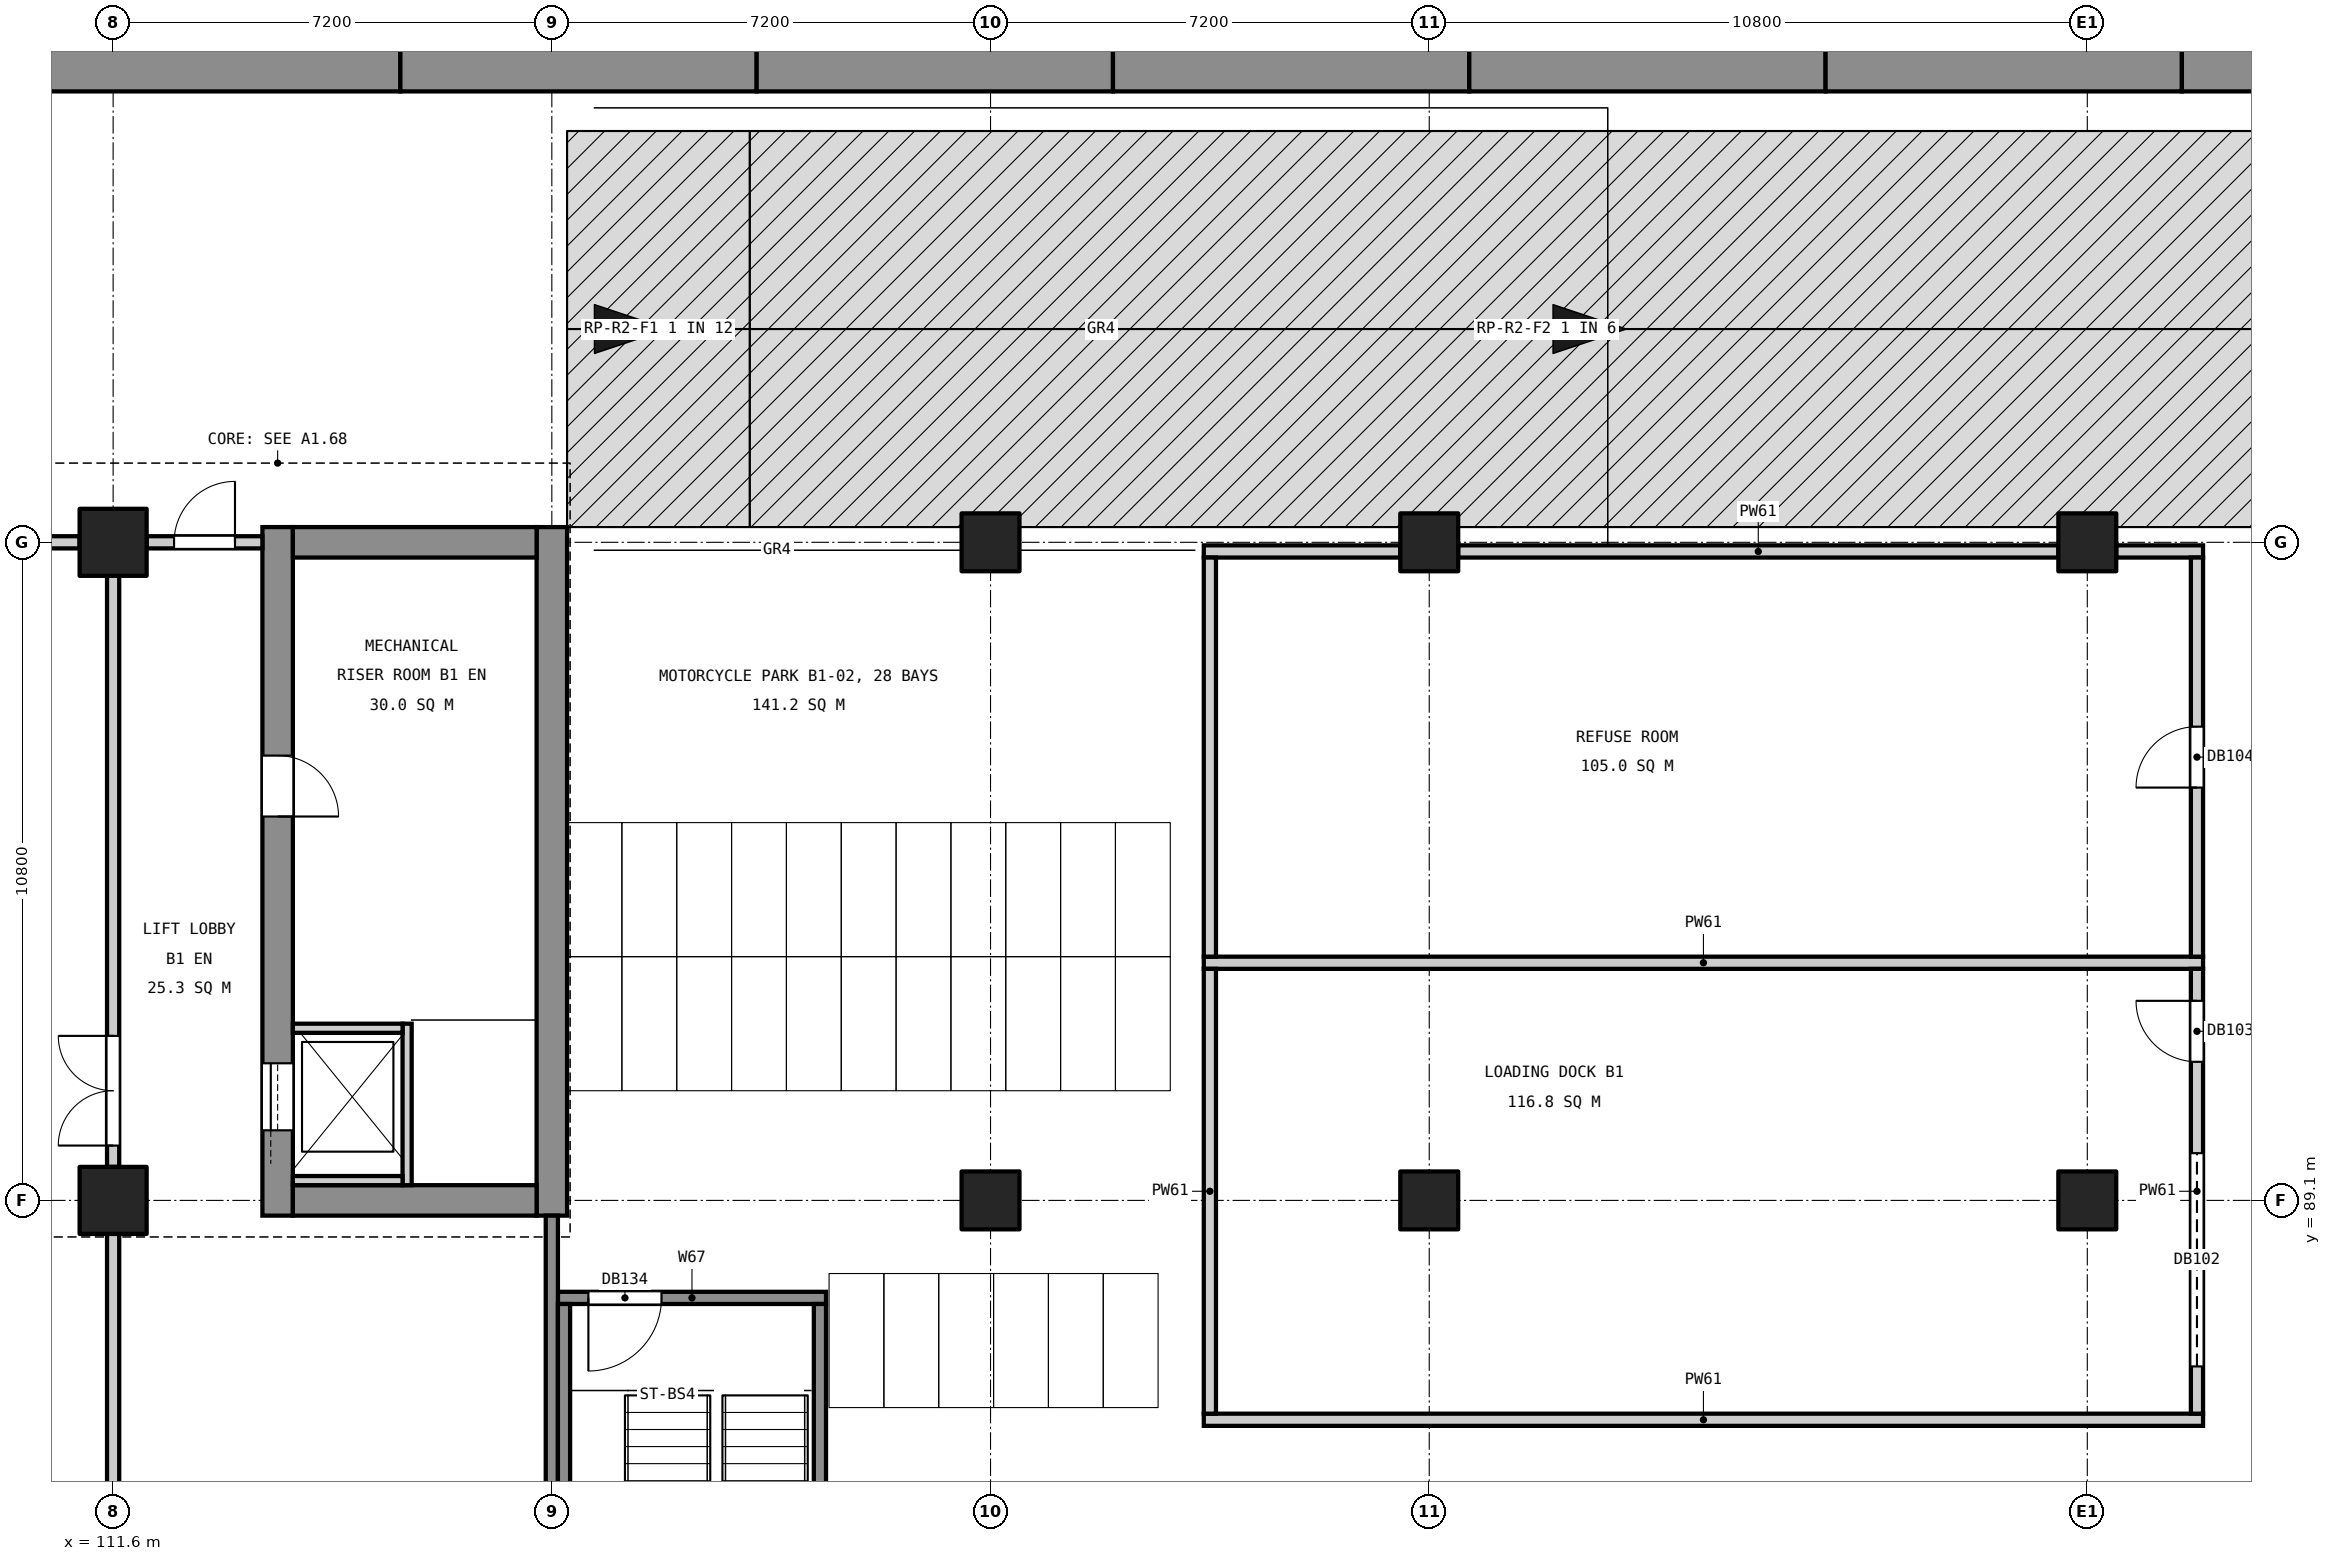
"""IFC4 building model, lengths in metres.
Left out: names, types, materials, properties, quantities, classifications, styles, units other than length and angle.
Written with IfcOpenShell. Run it as: python <this file> out.ifc"""

import sys

from ifc_helpers import new_model, si_unit, direction, frame, frame_2d, origin, origin_2d, place, context, subcontext, project, spatial, rectangle, extrude, element, fill, save


model = new_model("IFC4")
c1 = context("Model", 3, precision=1e-05, world=origin(), true_north=direction((0.0, 1.0)))
c2 = subcontext(c1, "Body", "Model", "MODEL_VIEW")
j1 = project(units=[si_unit("LENGTHUNIT", "METRE"), si_unit("PLANEANGLEUNIT", "RADIAN")], contexts=[c1])
p1 = place(None, origin())
s1 = spatial("IfcSite", under=j1, at=p1, CompositionType="ELEMENT")
p2 = place(p1, origin())
s2 = spatial("IfcBuilding", under=s1, at=p2, CompositionType="ELEMENT")
p3 = place(p2, frame((0.0, 0.0, -4.8)))
s3 = spatial("IfcBuildingStorey", under=s2, at=p3, CompositionType="ELEMENT", Elevation=-4.8)
for number, where, z_axis, x_axis in (
    (1, (111.6, 89.1, 0.0), (0.0, 0.0, 1.0), (1.0, 0.0, 0.0)),
    (2, (111.6, 99.9, 0.0), (0.0, 0.0, 1.0), (1.0, 0.0, 0.0)),
):
    element("IfcColumn", number, at=place(p3, frame(where, z_axis=z_axis, x_axis=x_axis)), inside=s3, PredefinedType="COLUMN", context=c2, shape_type="SweptSolid", body=[
        extrude(rectangle(XDim=1.1, YDim=1.1, at=origin_2d()), origin(), (0.0, 0.0, 1.0), 4.5),
    ])
for number, where, z_axis, x_axis in (
    (3, (126.0, 89.1, 0.0), (0.0, 0.0, 1.0), (1.0, 0.0, 0.0)),
    (4, (126.0, 99.9, 0.0), (0.0, 0.0, 1.0), (1.0, 0.0, 0.0)),
    (5, (133.2, 89.1, 0.0), (0.0, 0.0, 1.0), (1.0, 0.0, 0.0)),
    (6, (133.2, 99.9, 0.0), (0.0, 0.0, 1.0), (1.0, 0.0, 0.0)),
    (7, (144.0, 89.1, 0.0), (0.0, 0.0, 1.0), (1.0, 0.0, 0.0)),
    (8, (144.0, 99.9, 0.0), (0.0, 0.0, 1.0), (1.0, 0.0, 0.0)),
):
    element("IfcColumn", number, at=place(p3, frame(where, z_axis=z_axis, x_axis=x_axis)), inside=s3, PredefinedType="COLUMN", context=c2, shape_type="SweptSolid", body=[
        extrude(rectangle(XDim=0.95, YDim=0.95, at=origin_2d()), origin(), (0.0, 0.0, 1.0), 4.35),
    ])
for number, where, z_axis, x_axis in (
    (9, (110.467, 107.7, -18.2), (0.0, 0.0, 1.0), (1.0, 0.0, 0.0)),
    (10, (116.314, 107.7, -18.2), (0.0, 0.0, 1.0), (1.0, 0.0, 0.0)),
    (11, (122.162, 107.7, -18.2), (0.0, 0.0, 1.0), (1.0, 0.0, 0.0)),
    (12, (128.01, 107.7, -18.2), (0.0, 0.0, 1.0), (1.0, 0.0, 0.0)),
    (13, (133.857, 107.7, -18.2), (0.0, 0.0, 1.0), (1.0, 0.0, 0.0)),
    (14, (139.705, 107.7, -18.2), (0.0, 0.0, 1.0), (1.0, 0.0, 0.0)),
):
    element("IfcWall", number, at=place(p3, frame(where, z_axis=z_axis, x_axis=x_axis)), inside=s3, PredefinedType="SOLIDWALL", context=c2, shape_type="SweptSolid", body=[
        extrude(rectangle(XDim=5.848, YDim=0.8, at=frame_2d((2.924, 0.0))), origin(), (0.0, 0.0, 1.0), 21.55),
    ])
p4 = place(p3, frame((145.552, 107.7, -18.2), z_axis=(0.0, 0.0, 1.0), x_axis=(1.0, 0.0, 0.0)))
e15 = element("IfcWall", 15, at=p4, inside=s3, PredefinedType="SOLIDWALL", context=c2, shape_type="SweptSolid", body=[
    extrude(rectangle(XDim=5.847, YDim=0.8, at=frame_2d((2.924, 0.0))), origin(), (0.0, 0.0, 1.0), 21.55),
])
p5 = place(p3, frame((118.8, 88.85, 0.0), z_axis=(0.0, 0.0, 1.0), x_axis=(0.0, 1.0, 0.0)))
e16 = element("IfcWall", 16, at=p5, inside=s3, PredefinedType="SHEAR", context=c2, shape_type="SweptSolid", body=[
    extrude(rectangle(XDim=11.3, YDim=0.5, at=frame_2d((5.65, 0.0))), origin(), (0.0, 0.0, 1.0), 4.5),
])
p6 = place(p3, frame((114.3, 88.85, 0.0), z_axis=(0.0, 0.0, 1.0), x_axis=(0.0, 1.0, 0.0)))
e17 = element("IfcWall", 17, at=p6, inside=s3, PredefinedType="SHEAR", context=c2, shape_type="SweptSolid", body=[
    extrude(rectangle(XDim=11.3, YDim=0.5, at=frame_2d((5.65, 0.0))), origin(), (0.0, 0.0, 1.0), 4.5),
])
p7 = place(p6, frame((1.4, 0.0, 0.0)))
e18 = element("IfcOpeningElement", 18, at=p7, cuts=e17, PredefinedType="OPENING", context=c2, shape_type="SweptSolid", body=[
    extrude(rectangle(XDim=1.1, YDim=2.1, at=frame_2d((0.55, 1.05))), frame((0.0, 0.26, 0.0), z_axis=(0.0, -1.0, 0.0), x_axis=(1.0, 0.0, 0.0)), (0.0, 0.0, 1.0), 0.52),
])
p8 = place(p6, frame((6.55, 0.0, 0.0)))
e19 = element("IfcOpeningElement", 19, at=p8, cuts=e17, PredefinedType="OPENING", context=c2, shape_type="SweptSolid", body=[
    extrude(rectangle(XDim=1.0, YDim=2.1, at=frame_2d((0.5, 1.05))), frame((0.0, 0.26, 0.0), z_axis=(0.0, -1.0, 0.0), x_axis=(1.0, 0.0, 0.0)), (0.0, 0.0, 1.0), 0.52),
])
for number, where, z_axis, x_axis in (
    (20, (118.55, 89.1, 0.0), (0.0, 0.0, 1.0), (-1.0, 0.0, 0.0)),
    (21, (118.55, 99.9, 0.0), (0.0, 0.0, 1.0), (-1.0, 0.0, 0.0)),
):
    element("IfcWall", number, at=place(p3, frame(where, z_axis=z_axis, x_axis=x_axis)), inside=s3, PredefinedType="SHEAR", context=c2, shape_type="SweptSolid", body=[
        extrude(rectangle(XDim=4.0, YDim=0.5, at=frame_2d((2.0, 0.0))), origin(), (0.0, 0.0, 1.0), 4.5),
    ])
p9 = place(p3, frame((116.425, 92.0, 0.0), z_axis=(0.0, 0.0, 1.0), x_axis=(0.0, -1.0, 0.0)))
e22 = element("IfcWall", 22, at=p9, inside=s3, PredefinedType="SOLIDWALL", context=c2, shape_type="SweptSolid", body=[
    extrude(rectangle(XDim=2.65, YDim=0.15, at=frame_2d((1.325, 0.0))), origin(), (0.0, 0.0, 1.0), 4.8),
])
for number, where, z_axis, x_axis in (
    (23, (116.35, 91.925, 0.0), (0.0, 0.0, 1.0), (-1.0, 0.0, 0.0)),
    (24, (116.35, 89.425, 0.0), (0.0, 0.0, 1.0), (-1.0, 0.0, 0.0)),
):
    element("IfcWall", number, at=place(p3, frame(where, z_axis=z_axis, x_axis=x_axis)), inside=s3, PredefinedType="SOLIDWALL", context=c2, shape_type="SweptSolid", body=[
        extrude(rectangle(XDim=1.8, YDim=0.15, at=frame_2d((0.9, 0.0))), origin(), (0.0, 0.0, 1.0), 4.8),
    ])
p10 = place(p3, frame((129.5, 85.5, 0.0), z_axis=(0.0, 0.0, 1.0), x_axis=(1.0, 0.0, 0.0)))
e25 = element("IfcWall", 25, at=p10, inside=s3, PredefinedType="PARTITIONING", context=c2, shape_type="SweptSolid", body=[
    extrude(rectangle(XDim=16.4, YDim=0.2, at=frame_2d((8.2, 0.0))), origin(), (0.0, 0.0, 1.0), 4.35),
])
p11 = place(p3, frame((118.9, 87.5, 0.0), z_axis=(0.0, 0.0, 1.0), x_axis=(1.0, 0.0, 0.0)))
e26 = element("IfcWall", 26, at=p11, inside=s3, PredefinedType="SOLIDWALL", context=c2, shape_type="SweptSolid", body=[
    extrude(rectangle(XDim=4.4, YDim=0.2, at=frame_2d((2.2, 0.0))), origin(), (0.0, 0.0, 1.0), 4.35),
])
p12 = place(p11, frame((0.5, 0.0, 0.0)))
e27 = element("IfcOpeningElement", 27, at=p12, cuts=e26, PredefinedType="OPENING", context=c2, shape_type="SweptSolid", body=[
    extrude(rectangle(XDim=1.2, YDim=2.1, at=frame_2d((0.6, 1.05))), frame((0.0, 0.11, 0.0), z_axis=(0.0, -1.0, 0.0), x_axis=(1.0, 0.0, 0.0)), (0.0, 0.0, 1.0), 0.22),
])
p13 = place(p3, frame((129.5, 93.0, 0.0), z_axis=(0.0, 0.0, 1.0), x_axis=(1.0, 0.0, 0.0)))
e28 = element("IfcWall", 28, at=p13, inside=s3, PredefinedType="PARTITIONING", context=c2, shape_type="SweptSolid", body=[
    extrude(rectangle(XDim=16.4, YDim=0.2, at=frame_2d((8.2, 0.0))), origin(), (0.0, 0.0, 1.0), 4.35),
])
p14 = place(p3, frame((129.5, 99.75, 0.0), z_axis=(0.0, 0.0, 1.0), x_axis=(1.0, 0.0, 0.0)))
e29 = element("IfcWall", 29, at=p14, inside=s3, PredefinedType="PARTITIONING", context=c2, shape_type="SweptSolid", body=[
    extrude(rectangle(XDim=3.225, YDim=0.2, at=frame_2d((1.613, 0.0))), origin(), (0.0, 0.0, 1.0), 4.35),
])
p15 = place(p3, frame((133.675, 99.75, 0.0), z_axis=(0.0, 0.0, 1.0), x_axis=(1.0, 0.0, 0.0)))
e30 = element("IfcWall", 30, at=p15, inside=s3, PredefinedType="PARTITIONING", context=c2, shape_type="SweptSolid", body=[
    extrude(rectangle(XDim=9.85, YDim=0.2, at=frame_2d((4.925, 0.0))), origin(), (0.0, 0.0, 1.0), 4.35),
])
p16 = place(p3, frame((144.475, 99.75, 0.0), z_axis=(0.0, 0.0, 1.0), x_axis=(1.0, 0.0, 0.0)))
e31 = element("IfcWall", 31, at=p16, inside=s3, PredefinedType="PARTITIONING", context=c2, shape_type="SweptSolid", body=[
    extrude(rectangle(XDim=1.425, YDim=0.2, at=frame_2d((0.712, 0.0))), origin(), (0.0, 0.0, 1.0), 4.35),
])
p17 = place(p3, frame((101.35, 99.9, 0.0), z_axis=(0.0, 0.0, 1.0), x_axis=(1.0, 0.0, 0.0)))
e32 = element("IfcWall", 32, at=p17, inside=s3, PredefinedType="PARTITIONING", context=c2, shape_type="SweptSolid", body=[
    extrude(rectangle(XDim=9.7, YDim=0.2, at=frame_2d((4.85, 0.0))), origin(), (0.0, 0.0, 1.0), 3.7),
])
p18 = place(p3, frame((112.15, 99.9, 0.0), z_axis=(0.0, 0.0, 1.0), x_axis=(1.0, 0.0, 0.0)))
e33 = element("IfcWall", 33, at=p18, inside=s3, PredefinedType="PARTITIONING", context=c2, shape_type="SweptSolid", body=[
    extrude(rectangle(XDim=1.9, YDim=0.2, at=frame_2d((0.95, 0.0))), origin(), (0.0, 0.0, 1.0), 3.7),
])
p19 = place(p18, frame((0.45, 0.0, 0.0)))
e34 = element("IfcOpeningElement", 34, at=p19, cuts=e33, PredefinedType="OPENING", context=c2, shape_type="SweptSolid", body=[
    extrude(rectangle(XDim=1.0, YDim=2.1, at=frame_2d((0.5, 1.05))), frame((0.0, 0.11, 0.0), z_axis=(0.0, -1.0, 0.0), x_axis=(1.0, 0.0, 0.0)), (0.0, 0.0, 1.0), 0.22),
])
p20 = place(p3, frame((111.6, 82.0, 0.0), z_axis=(0.0, 0.0, 1.0), x_axis=(0.0, 1.0, 0.0)))
e35 = element("IfcWall", 35, at=p20, inside=s3, PredefinedType="PARTITIONING", context=c2, shape_type="SweptSolid", body=[
    extrude(rectangle(XDim=6.55, YDim=0.2, at=frame_2d((3.275, 0.0))), origin(), (0.0, 0.0, 1.0), 3.4),
])
p21 = place(p3, frame((111.6, 89.65, 0.0), z_axis=(0.0, 0.0, 1.0), x_axis=(0.0, 1.0, 0.0)))
e36 = element("IfcWall", 36, at=p21, inside=s3, PredefinedType="PARTITIONING", context=c2, shape_type="SweptSolid", body=[
    extrude(rectangle(XDim=9.7, YDim=0.2, at=frame_2d((4.85, 0.0))), origin(), (0.0, 0.0, 1.0), 3.4),
])
p22 = place(p21, frame((0.35, 0.0, 0.0)))
e37 = element("IfcOpeningElement", 37, at=p22, cuts=e36, PredefinedType="OPENING", context=c2, shape_type="SweptSolid", body=[
    extrude(rectangle(XDim=1.8, YDim=2.1, at=frame_2d((0.9, 1.05))), frame((0.0, 0.11, 0.0), z_axis=(0.0, -1.0, 0.0), x_axis=(1.0, 0.0, 0.0)), (0.0, 0.0, 1.0), 0.22),
])
p23 = place(p3, frame((118.8, 78.85, 0.0), z_axis=(0.0, 0.0, 1.0), x_axis=(0.0, 1.0, 0.0)))
e38 = element("IfcWall", 38, at=p23, inside=s3, PredefinedType="SOLIDWALL", context=c2, shape_type="SweptSolid", body=[
    extrude(rectangle(XDim=10.0, YDim=0.2, at=frame_2d((5.0, 0.0))), origin(), (0.0, 0.0, 1.0), 4.5),
])
p24 = place(p3, frame((119.0, 80.6, 0.0), z_axis=(0.0, 0.0, 1.0), x_axis=(0.0, 1.0, 0.0)))
e39 = element("IfcWall", 39, at=p24, inside=s3, PredefinedType="SOLIDWALL", context=c2, shape_type="SweptSolid", body=[
    extrude(rectangle(XDim=6.8, YDim=0.2, at=frame_2d((3.4, 0.0))), origin(), (0.0, 0.0, 1.0), 4.5),
])
p25 = place(p3, frame((123.2, 80.6, 0.0), z_axis=(0.0, 0.0, 1.0), x_axis=(0.0, 1.0, 0.0)))
e40 = element("IfcWall", 40, at=p25, inside=s3, PredefinedType="SOLIDWALL", context=c2, shape_type="SweptSolid", body=[
    extrude(rectangle(XDim=6.8, YDim=0.2, at=frame_2d((3.4, 0.0))), origin(), (0.0, 0.0, 1.0), 4.35),
])
p26 = place(p3, frame((129.6, 85.6, 0.0), z_axis=(0.0, 0.0, 1.0), x_axis=(0.0, 1.0, 0.0)))
e41 = element("IfcWall", 41, at=p26, inside=s3, PredefinedType="PARTITIONING", context=c2, shape_type="SweptSolid", body=[
    extrude(rectangle(XDim=7.3, YDim=0.2, at=frame_2d((3.65, 0.0))), origin(), (0.0, 0.0, 1.0), 4.35),
])
p27 = place(p3, frame((129.6, 93.1, 0.0), z_axis=(0.0, 0.0, 1.0), x_axis=(0.0, 1.0, 0.0)))
e42 = element("IfcWall", 42, at=p27, inside=s3, PredefinedType="PARTITIONING", context=c2, shape_type="SweptSolid", body=[
    extrude(rectangle(XDim=6.55, YDim=0.2, at=frame_2d((3.275, 0.0))), origin(), (0.0, 0.0, 1.0), 4.35),
])
p28 = place(p3, frame((145.8, 85.6, 0.0), z_axis=(0.0, 0.0, 1.0), x_axis=(0.0, 1.0, 0.0)))
e43 = element("IfcWall", 43, at=p28, inside=s3, PredefinedType="PARTITIONING", context=c2, shape_type="SweptSolid", body=[
    extrude(rectangle(XDim=7.3, YDim=0.2, at=frame_2d((3.65, 0.0))), origin(), (0.0, 0.0, 1.0), 4.35),
])
p29 = place(p28, frame((0.775, 0.0, 0.0)))
e44 = element("IfcOpeningElement", 44, at=p29, cuts=e43, PredefinedType="OPENING", context=c2, shape_type="SweptSolid", body=[
    extrude(rectangle(XDim=3.5, YDim=3.8, at=frame_2d((1.75, 1.9))), frame((0.0, 0.11, 0.0), z_axis=(0.0, -1.0, 0.0), x_axis=(1.0, 0.0, 0.0)), (0.0, 0.0, 1.0), 0.22),
])
p30 = place(p28, frame((5.775, 0.0, 0.0)))
e45 = element("IfcOpeningElement", 45, at=p30, cuts=e43, PredefinedType="OPENING", context=c2, shape_type="SweptSolid", body=[
    extrude(rectangle(XDim=1.0, YDim=2.1, at=frame_2d((0.5, 1.05))), frame((0.0, 0.11, 0.0), z_axis=(0.0, -1.0, 0.0), x_axis=(1.0, 0.0, 0.0)), (0.0, 0.0, 1.0), 0.22),
])
p31 = place(p3, frame((145.8, 93.1, 0.0), z_axis=(0.0, 0.0, 1.0), x_axis=(0.0, 1.0, 0.0)))
e46 = element("IfcWall", 46, at=p31, inside=s3, PredefinedType="PARTITIONING", context=c2, shape_type="SweptSolid", body=[
    extrude(rectangle(XDim=6.55, YDim=0.2, at=frame_2d((3.275, 0.0))), origin(), (0.0, 0.0, 1.0), 4.35),
])
p32 = place(p31, frame((2.775, 0.0, 0.0)))
e47 = element("IfcOpeningElement", 47, at=p32, cuts=e46, PredefinedType="OPENING", context=c2, shape_type="SweptSolid", body=[
    extrude(rectangle(XDim=1.0, YDim=2.1, at=frame_2d((0.5, 1.05))), frame((0.0, 0.11, 0.0), z_axis=(0.0, -1.0, 0.0), x_axis=(1.0, 0.0, 0.0)), (0.0, 0.0, 1.0), 0.22),
])
p33 = place(p7, origin())
e48 = element("IfcDoor", 48, at=p33, inside=s3, OperationType="SLIDING_TO_LEFT", PredefinedType="DOOR", context=c2, shape_type="SweptSolid", body=[
    extrude(rectangle(XDim=1.1, YDim=2.1, at=frame_2d((0.55, 1.05))), frame((0.0, 0.025, 0.0), z_axis=(0.0, -1.0, 0.0), x_axis=(1.0, 0.0, 0.0)), (0.0, 0.0, 1.0), 0.05),
])
fill(e18, e48)
p34 = place(p29, frame((3.5, 0.0, 0.0), z_axis=(0.0, 0.0, 1.0), x_axis=(-1.0, 0.0, 0.0)))
e49 = element("IfcDoor", 49, at=p34, inside=s3, OperationType="ROLLINGUP", PredefinedType="DOOR", context=c2, shape_type="SweptSolid", body=[
    extrude(rectangle(XDim=3.5, YDim=3.8, at=frame_2d((1.75, 1.9))), frame((0.0, 0.025, 0.0), z_axis=(0.0, -1.0, 0.0), x_axis=(1.0, 0.0, 0.0)), (0.0, 0.0, 1.0), 0.05),
])
fill(e44, e49)
p35 = place(p30, origin())
e50 = element("IfcDoor", 50, at=p35, inside=s3, OperationType="SINGLE_SWING_RIGHT", PredefinedType="DOOR", context=c2, shape_type="SweptSolid", body=[
    extrude(rectangle(XDim=1.0, YDim=2.1, at=frame_2d((0.5, 1.05))), frame((0.0, 0.025, 0.0), z_axis=(0.0, -1.0, 0.0), x_axis=(1.0, 0.0, 0.0)), (0.0, 0.0, 1.0), 0.05),
])
fill(e45, e50)
p36 = place(p32, origin())
e51 = element("IfcDoor", 51, at=p36, inside=s3, OperationType="SINGLE_SWING_LEFT", PredefinedType="DOOR", context=c2, shape_type="SweptSolid", body=[
    extrude(rectangle(XDim=1.0, YDim=2.1, at=frame_2d((0.5, 1.05))), frame((0.0, 0.025, 0.0), z_axis=(0.0, -1.0, 0.0), x_axis=(1.0, 0.0, 0.0)), (0.0, 0.0, 1.0), 0.05),
])
fill(e47, e51)
p37 = place(p22, origin())
e52 = element("IfcDoor", 52, at=p37, inside=s3, OperationType="DOUBLE_DOOR_SINGLE_SWING", PredefinedType="DOOR", context=c2, shape_type="SweptSolid", body=[
    extrude(rectangle(XDim=1.8, YDim=2.1, at=frame_2d((0.9, 1.05))), frame((0.0, 0.025, 0.0), z_axis=(0.0, -1.0, 0.0), x_axis=(1.0, 0.0, 0.0)), (0.0, 0.0, 1.0), 0.05),
])
fill(e37, e52)
p38 = place(p19, origin())
e53 = element("IfcDoor", 53, at=p38, inside=s3, OperationType="SINGLE_SWING_RIGHT", PredefinedType="DOOR", context=c2, shape_type="SweptSolid", body=[
    extrude(rectangle(XDim=1.0, YDim=2.1, at=frame_2d((0.5, 1.05))), frame((0.0, 0.025, 0.0), z_axis=(0.0, -1.0, 0.0), x_axis=(1.0, 0.0, 0.0)), (0.0, 0.0, 1.0), 0.05),
])
fill(e34, e53)
p39 = place(p8, frame((1.0, 0.0, 0.0), z_axis=(0.0, 0.0, 1.0), x_axis=(-1.0, 0.0, 0.0)))
e54 = element("IfcDoor", 54, at=p39, inside=s3, OperationType="SINGLE_SWING_RIGHT", PredefinedType="DOOR", context=c2, shape_type="SweptSolid", body=[
    extrude(rectangle(XDim=1.0, YDim=2.1, at=frame_2d((0.5, 1.05))), frame((0.0, 0.025, 0.0), z_axis=(0.0, -1.0, 0.0), x_axis=(1.0, 0.0, 0.0)), (0.0, 0.0, 1.0), 0.05),
])
fill(e19, e54)
p40 = place(p12, frame((1.2, 0.0, 0.0), z_axis=(0.0, 0.0, 1.0), x_axis=(-1.0, 0.0, 0.0)))
e55 = element("IfcDoor", 55, at=p40, inside=s3, OperationType="SINGLE_SWING_RIGHT", PredefinedType="DOOR", context=c2, shape_type="SweptSolid", body=[
    extrude(rectangle(XDim=1.2, YDim=2.1, at=frame_2d((0.6, 1.05))), frame((0.0, 0.025, 0.0), z_axis=(0.0, -1.0, 0.0), x_axis=(1.0, 0.0, 0.0)), (0.0, 0.0, 1.0), 0.05),
])
fill(e27, e55)
save(model, sys.argv[1])
